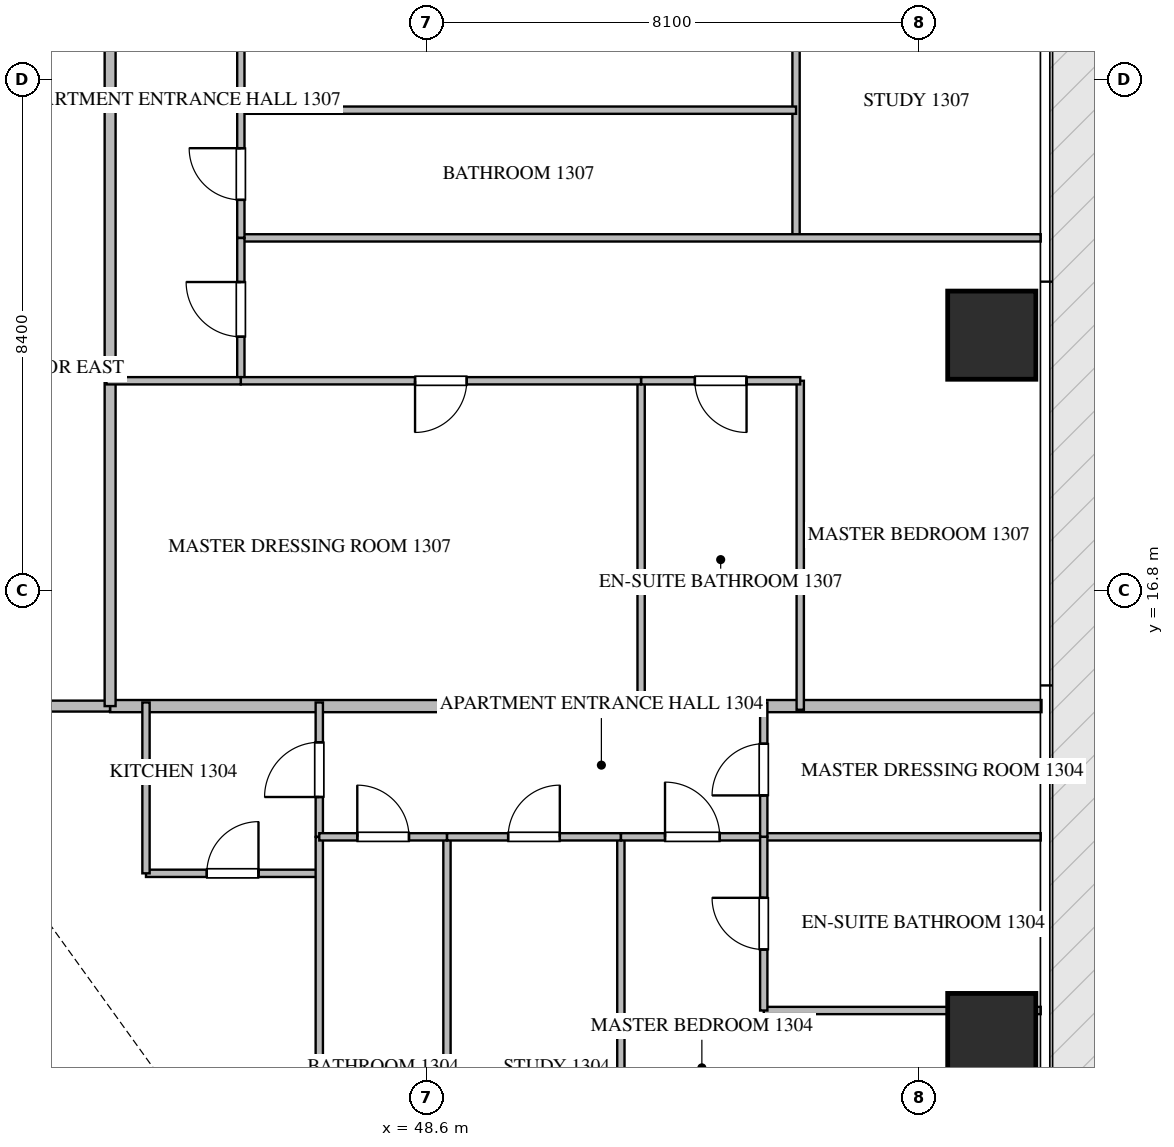
"""IFC4 building model, lengths in metres.
Left out: names, types, materials, properties, quantities, classifications, styles, units other than length and angle.
Written with IfcOpenShell. Run it as: python <this file> out.ifc"""

import sys

from ifc_helpers import new_model, si_unit, direction, frame, frame_2d, origin, origin_2d, place, context, subcontext, project, spatial, rectangle, extrude, source, transform, mapped, element, fill, save


model = new_model("IFC4")
c1 = context("Model", 3, precision=1e-05, world=origin(), true_north=direction((0.0, 1.0)))
c2 = subcontext(c1, "Body", "Model", "MODEL_VIEW")
j1 = project(units=[si_unit("LENGTHUNIT", "METRE"), si_unit("PLANEANGLEUNIT", "RADIAN")], contexts=[c1])
p1 = place(None, origin())
s1 = spatial("IfcSite", under=j1, at=p1, CompositionType="ELEMENT")
p2 = place(p1, origin())
s2 = spatial("IfcBuilding", under=s1, at=p2, CompositionType="ELEMENT")
p3 = place(p2, frame((0.0, 0.0, 56.7)))
s3 = spatial("IfcBuildingStorey", under=s2, at=p3, CompositionType="ELEMENT", Elevation=56.7)
m1 = source(origin(), c2, "Body", "SweptSolid", [
    extrude(rectangle(XDim=1.45, YDim=1.45, at=origin_2d()), origin(), (0.0, 0.0, 1.0), 3.75),
])
for number, where, z_axis, x_axis in (
    (1, (57.9, 9.45, -0.26), (0.0, 0.0, 1.0), (1.0, 0.0, 0.0)),
    (2, (57.9, 21.0, -0.26), (0.0, 0.0, 1.0), (1.0, 0.0, 0.0)),
):
    element("IfcColumn", number, at=place(p3, frame(where, z_axis=z_axis, x_axis=x_axis)), inside=s3, PredefinedType="COLUMN", context=c2, shape_type="MappedRepresentation", body=[
        mapped(m1, transform((0.0, 0.0, 0.0), scale=1.0)),
    ])
p4 = place(p3, frame((43.4, 14.9, 0.0), z_axis=(0.0, 0.0, 1.0), x_axis=(1.0, 0.0, 0.0)))
e3 = element("IfcWall", 3, at=p4, inside=s3, PredefinedType="PARTITIONING", context=c2, shape_type="SweptSolid", body=[
    extrude(rectangle(XDim=15.318, YDim=0.2, at=frame_2d((7.659, 0.0))), origin(), (0.0, 0.0, 1.0), 3.49),
])
p5 = place(p3, frame((21.402, 14.9, 0.0), z_axis=(0.0, 0.0, 1.0), x_axis=(1.0, 0.0, 0.0)))
e4 = element("IfcWall", 4, at=p5, inside=s3, PredefinedType="PARTITIONING", context=c2, shape_type="SweptSolid", body=[
    extrude(rectangle(XDim=21.996, YDim=0.18, at=frame_2d((10.998, 0.0))), origin(), (0.0, 0.0, 1.0), 3.49),
])
p6 = place(p5, frame((1.96, 0.0, 0.0)))
e5 = element("IfcOpeningElement", 5, at=p6, cuts=e4, PredefinedType="OPENING", context=c2, shape_type="SweptSolid", body=[
    extrude(rectangle(XDim=1.0, YDim=2.15, at=frame_2d((0.5, 1.075))), frame((0.0, 0.1, 0.0), z_axis=(0.0, -1.0, 0.0), x_axis=(1.0, 0.0, 0.0)), (0.0, 0.0, 1.0), 0.2),
])
p7 = place(p5, frame((5.249, 0.0, 0.0)))
e6 = element("IfcOpeningElement", 6, at=p7, cuts=e4, PredefinedType="OPENING", context=c2, shape_type="SweptSolid", body=[
    extrude(rectangle(XDim=1.0, YDim=2.15, at=frame_2d((0.5, 1.075))), frame((0.0, 0.1, 0.0), z_axis=(0.0, -1.0, 0.0), x_axis=(1.0, 0.0, 0.0)), (0.0, 0.0, 1.0), 0.2),
])
p8 = place(p5, frame((11.653, 0.0, 0.0)))
e7 = element("IfcOpeningElement", 7, at=p8, cuts=e4, PredefinedType="OPENING", context=c2, shape_type="SweptSolid", body=[
    extrude(rectangle(XDim=1.0, YDim=2.15, at=frame_2d((0.5, 1.075))), frame((0.0, 0.1, 0.0), z_axis=(0.0, -1.0, 0.0), x_axis=(1.0, 0.0, 0.0)), (0.0, 0.0, 1.0), 0.2),
])
p9 = place(p5, frame((18.896, 0.0, 0.0)))
e8 = element("IfcOpeningElement", 8, at=p9, cuts=e4, PredefinedType="OPENING", context=c2, shape_type="SweptSolid", body=[
    extrude(rectangle(XDim=1.0, YDim=2.15, at=frame_2d((0.5, 1.075))), frame((0.0, 0.1, 0.0), z_axis=(0.0, -1.0, 0.0), x_axis=(1.0, 0.0, 0.0)), (0.0, 0.0, 1.0), 0.2),
])
p10 = place(p3, frame((43.4, 14.9, 0.0), z_axis=(0.0, 0.0, 1.0), x_axis=(0.0, 1.0, 0.0)))
e9 = element("IfcWall", 9, at=p10, inside=s3, PredefinedType="PARTITIONING", context=c2, shape_type="SweptSolid", body=[
    extrude(rectangle(XDim=20.6, YDim=0.18, at=frame_2d((10.3, 0.0))), origin(), (0.0, 0.0, 1.0), 3.49),
])
p11 = place(p10, frame((17.64, 0.0, 0.0)))
e10 = element("IfcOpeningElement", 10, at=p11, cuts=e9, PredefinedType="OPENING", context=c2, shape_type="SweptSolid", body=[
    extrude(rectangle(XDim=1.0, YDim=2.15, at=frame_2d((0.5, 1.075))), frame((0.0, 0.1, 0.0), z_axis=(0.0, -1.0, 0.0), x_axis=(1.0, 0.0, 0.0)), (0.0, 0.0, 1.0), 0.2),
])
p12 = place(p3, frame((43.99, 12.15, 0.0), z_axis=(0.0, 0.0, 1.0), x_axis=(1.0, 0.0, 0.0)))
e11 = element("IfcWall", 11, at=p12, inside=s3, PredefinedType="PARTITIONING", context=c2, shape_type="SweptSolid", body=[
    extrude(rectangle(XDim=2.85, YDim=0.12, at=frame_2d((1.425, 0.0))), origin(), (0.0, 0.0, 1.0), 3.49),
])
p13 = place(p12, frame((1.0, 0.0, 0.0)))
e12 = element("IfcOpeningElement", 12, at=p13, cuts=e11, PredefinedType="OPENING", context=c2, shape_type="SweptSolid", body=[
    extrude(rectangle(XDim=0.85, YDim=2.1, at=frame_2d((0.425, 1.05))), frame((0.0, 0.07, 0.0), z_axis=(0.0, -1.0, 0.0), x_axis=(1.0, 0.0, 0.0)), (0.0, 0.0, 1.0), 0.14),
])
p14 = place(p3, frame((43.99, 12.15, 0.0), z_axis=(0.0, 0.0, 1.0), x_axis=(0.0, 1.0, 0.0)))
e13 = element("IfcWall", 13, at=p14, inside=s3, PredefinedType="PARTITIONING", context=c2, shape_type="SweptSolid", body=[
    extrude(rectangle(XDim=2.81, YDim=0.12, at=frame_2d((1.405, 0.0))), origin(), (0.0, 0.0, 1.0), 3.49),
])
p15 = place(p3, frame((46.84, 12.75, 0.0), z_axis=(0.0, 0.0, 1.0), x_axis=(0.0, 1.0, 0.0)))
e14 = element("IfcWall", 14, at=p15, inside=s3, PredefinedType="PARTITIONING", context=c2, shape_type="SweptSolid", body=[
    extrude(rectangle(XDim=2.21, YDim=0.12, at=frame_2d((1.105, 0.0))), origin(), (0.0, 0.0, 1.0), 3.49),
])
p16 = place(p15, frame((0.655, 0.0, 0.0)))
e15 = element("IfcOpeningElement", 15, at=p16, cuts=e14, PredefinedType="OPENING", context=c2, shape_type="SweptSolid", body=[
    extrude(rectangle(XDim=0.9, YDim=2.1, at=frame_2d((0.45, 1.05))), frame((0.0, 0.07, 0.0), z_axis=(0.0, -1.0, 0.0), x_axis=(1.0, 0.0, 0.0)), (0.0, 0.0, 1.0), 0.14),
])
p17 = place(p3, frame((46.84, 5.721, 0.0), z_axis=(0.0, 0.0, 1.0), x_axis=(0.0, 1.0, 0.0)))
e16 = element("IfcWall", 16, at=p17, inside=s3, PredefinedType="PARTITIONING", context=c2, shape_type="SweptSolid", body=[
    extrude(rectangle(XDim=7.027, YDim=0.12, at=frame_2d((3.514, 0.0))), origin(), (0.0, 0.0, 1.0), 3.49),
])
p18 = place(p3, frame((51.8, 4.495, 0.0), z_axis=(0.0, 0.0, 1.0), x_axis=(0.0, 1.0, 0.0)))
e17 = element("IfcWall", 17, at=p18, inside=s3, PredefinedType="PARTITIONING", context=c2, shape_type="SweptSolid", body=[
    extrude(rectangle(XDim=8.255, YDim=0.12, at=frame_2d((4.127, 0.0))), origin(), (0.0, 0.0, 1.0), 3.49),
])
p19 = place(p3, frame((48.94, 5.719, 0.0), z_axis=(0.0, 0.0, 1.0), x_axis=(0.0, 1.0, 0.0)))
e18 = element("IfcWall", 18, at=p19, inside=s3, PredefinedType="PARTITIONING", context=c2, shape_type="SweptSolid", body=[
    extrude(rectangle(XDim=7.031, YDim=0.12, at=frame_2d((3.516, 0.0))), origin(), (0.0, 0.0, 1.0), 3.49),
])
p20 = place(p3, frame((46.84, 12.75, 0.0), z_axis=(0.0, 0.0, 1.0), x_axis=(1.0, 0.0, 0.0)))
e19 = element("IfcWall", 19, at=p20, inside=s3, PredefinedType="PARTITIONING", context=c2, shape_type="SweptSolid", body=[
    extrude(rectangle(XDim=2.1, YDim=0.12, at=frame_2d((1.05, 0.0))), origin(), (0.0, 0.0, 1.0), 3.49),
])
p21 = place(p20, frame((0.625, 0.0, 0.0)))
e20 = element("IfcOpeningElement", 20, at=p21, cuts=e19, PredefinedType="OPENING", context=c2, shape_type="SweptSolid", body=[
    extrude(rectangle(XDim=0.85, YDim=2.1, at=frame_2d((0.425, 1.05))), frame((0.0, 0.07, 0.0), z_axis=(0.0, -1.0, 0.0), x_axis=(1.0, 0.0, 0.0)), (0.0, 0.0, 1.0), 0.14),
])
p22 = place(p3, frame((48.942, 12.75, 0.0), z_axis=(0.0, 0.0, 1.0), x_axis=(1.0, 0.0, 0.0)))
e21 = element("IfcWall", 21, at=p22, inside=s3, PredefinedType="PARTITIONING", context=c2, shape_type="SweptSolid", body=[
    extrude(rectangle(XDim=2.858, YDim=0.12, at=frame_2d((1.429, 0.0))), origin(), (0.0, 0.0, 1.0), 3.49),
])
p23 = place(p22, frame((1.004, 0.0, 0.0)))
e22 = element("IfcOpeningElement", 22, at=p23, cuts=e21, PredefinedType="OPENING", context=c2, shape_type="SweptSolid", body=[
    extrude(rectangle(XDim=0.85, YDim=2.1, at=frame_2d((0.425, 1.05))), frame((0.0, 0.07, 0.0), z_axis=(0.0, -1.0, 0.0), x_axis=(1.0, 0.0, 0.0)), (0.0, 0.0, 1.0), 0.14),
])
p24 = place(p3, frame((51.802, 12.75, 0.0), z_axis=(0.0, 0.0, 1.0), x_axis=(1.0, 0.0, 0.0)))
e23 = element("IfcWall", 23, at=p24, inside=s3, PredefinedType="PARTITIONING", context=c2, shape_type="SweptSolid", body=[
    extrude(rectangle(XDim=2.348, YDim=0.12, at=frame_2d((1.174, 0.0))), origin(), (0.0, 0.0, 1.0), 3.49),
])
p25 = place(p24, frame((0.724, 0.0, 0.0)))
e24 = element("IfcOpeningElement", 24, at=p25, cuts=e23, PredefinedType="OPENING", context=c2, shape_type="SweptSolid", body=[
    extrude(rectangle(XDim=0.9, YDim=2.1, at=frame_2d((0.45, 1.05))), frame((0.0, 0.07, 0.0), z_axis=(0.0, -1.0, 0.0), x_axis=(1.0, 0.0, 0.0)), (0.0, 0.0, 1.0), 0.14),
])
p26 = place(p3, frame((54.15, 9.894, 0.0), z_axis=(0.0, 0.0, 1.0), x_axis=(1.0, 0.0, 0.0)))
e25 = element("IfcWall", 25, at=p26, inside=s3, PredefinedType="PARTITIONING", context=c2, shape_type="SweptSolid", body=[
    extrude(rectangle(XDim=4.555, YDim=0.12, at=frame_2d((2.278, 0.0))), origin(), (0.0, 0.0, 1.0), 3.49),
])
p27 = place(p3, frame((54.152, 12.75, 0.0), z_axis=(0.0, 0.0, 1.0), x_axis=(1.0, 0.0, 0.0)))
e26 = element("IfcWall", 26, at=p27, inside=s3, PredefinedType="PARTITIONING", context=c2, shape_type="SweptSolid", body=[
    extrude(rectangle(XDim=4.553, YDim=0.12, at=frame_2d((2.276, 0.0))), origin(), (0.0, 0.0, 1.0), 3.49),
])
p28 = place(p3, frame((54.15, 9.894, 0.0), z_axis=(0.0, 0.0, 1.0), x_axis=(0.0, 1.0, 0.0)))
e27 = element("IfcWall", 27, at=p28, inside=s3, PredefinedType="PARTITIONING", context=c2, shape_type="SweptSolid", body=[
    extrude(rectangle(XDim=2.856, YDim=0.12, at=frame_2d((1.428, 0.0))), origin(), (0.0, 0.0, 1.0), 3.49),
])
p29 = place(p28, frame((1.003, 0.0, 0.0)))
e28 = element("IfcOpeningElement", 28, at=p29, cuts=e27, PredefinedType="OPENING", context=c2, shape_type="SweptSolid", body=[
    extrude(rectangle(XDim=0.85, YDim=2.1, at=frame_2d((0.425, 1.05))), frame((0.0, 0.07, 0.0), z_axis=(0.0, -1.0, 0.0), x_axis=(1.0, 0.0, 0.0)), (0.0, 0.0, 1.0), 0.14),
])
p30 = place(p3, frame((54.15, 12.752, 0.0), z_axis=(0.0, 0.0, 1.0), x_axis=(0.0, 1.0, 0.0)))
e29 = element("IfcWall", 29, at=p30, inside=s3, PredefinedType="PARTITIONING", context=c2, shape_type="SweptSolid", body=[
    extrude(rectangle(XDim=2.208, YDim=0.12, at=frame_2d((1.104, 0.0))), origin(), (0.0, 0.0, 1.0), 3.49),
])
p31 = place(p30, frame((0.679, 0.0, 0.0)))
e30 = element("IfcOpeningElement", 30, at=p31, cuts=e29, PredefinedType="OPENING", context=c2, shape_type="SweptSolid", body=[
    extrude(rectangle(XDim=0.85, YDim=2.1, at=frame_2d((0.425, 1.05))), frame((0.0, 0.07, 0.0), z_axis=(0.0, -1.0, 0.0), x_axis=(1.0, 0.0, 0.0)), (0.0, 0.0, 1.0), 0.14),
])
p32 = place(p3, frame((54.681, 22.6, 0.0), z_axis=(0.0, 0.0, 1.0), x_axis=(0.0, 1.0, 0.0)))
e31 = element("IfcWall", 31, at=p32, inside=s3, PredefinedType="PARTITIONING", context=c2, shape_type="SweptSolid", body=[
    extrude(rectangle(XDim=5.07, YDim=0.12, at=frame_2d((2.535, 0.0))), origin(), (0.0, 0.0, 1.0), 3.49),
])
p33 = place(p3, frame((58.705, 22.6, 0.0), z_axis=(0.0, 0.0, 1.0), x_axis=(-1.0, 0.0, 0.0)))
e32 = element("IfcWall", 32, at=p33, inside=s3, PredefinedType="PARTITIONING", context=c2, shape_type="SweptSolid", body=[
    extrude(rectangle(XDim=13.155, YDim=0.12, at=frame_2d((6.578, 0.0))), origin(), (0.0, 0.0, 1.0), 3.49),
])
p34 = place(p3, frame((54.681, 24.7, 0.0), z_axis=(0.0, 0.0, 1.0), x_axis=(-1.0, 0.0, 0.0)))
e33 = element("IfcWall", 33, at=p34, inside=s3, PredefinedType="PARTITIONING", context=c2, shape_type="SweptSolid", body=[
    extrude(rectangle(XDim=9.131, YDim=0.12, at=frame_2d((4.565, 0.0))), origin(), (0.0, 0.0, 1.0), 3.49),
])
p35 = place(p3, frame((45.55, 22.6, 0.0), z_axis=(0.0, 0.0, 1.0), x_axis=(0.0, 1.0, 0.0)))
e34 = element("IfcWall", 34, at=p35, inside=s3, PredefinedType="PARTITIONING", context=c2, shape_type="SweptSolid", body=[
    extrude(rectangle(XDim=2.1, YDim=0.12, at=frame_2d((1.05, 0.0))), origin(), (0.0, 0.0, 1.0), 3.49),
])
p36 = place(p35, frame((0.625, 0.0, 0.0)))
e35 = element("IfcOpeningElement", 35, at=p36, cuts=e34, PredefinedType="OPENING", context=c2, shape_type="SweptSolid", body=[
    extrude(rectangle(XDim=0.85, YDim=2.1, at=frame_2d((0.425, 1.05))), frame((0.0, 0.07, 0.0), z_axis=(0.0, -1.0, 0.0), x_axis=(1.0, 0.0, 0.0)), (0.0, 0.0, 1.0), 0.14),
])
p37 = place(p3, frame((45.55, 24.702, 0.0), z_axis=(0.0, 0.0, 1.0), x_axis=(0.0, 1.0, 0.0)))
e36 = element("IfcWall", 36, at=p37, inside=s3, PredefinedType="PARTITIONING", context=c2, shape_type="SweptSolid", body=[
    extrude(rectangle(XDim=2.968, YDim=0.12, at=frame_2d((1.484, 0.0))), origin(), (0.0, 0.0, 1.0), 3.49),
])
p38 = place(p37, frame((1.059, 0.0, 0.0)))
e37 = element("IfcOpeningElement", 37, at=p38, cuts=e36, PredefinedType="OPENING", context=c2, shape_type="SweptSolid", body=[
    extrude(rectangle(XDim=0.85, YDim=2.1, at=frame_2d((0.425, 1.05))), frame((0.0, 0.07, 0.0), z_axis=(0.0, -1.0, 0.0), x_axis=(1.0, 0.0, 0.0)), (0.0, 0.0, 1.0), 0.14),
])
p39 = place(p3, frame((45.55, 20.25, 0.0), z_axis=(0.0, 0.0, 1.0), x_axis=(0.0, 1.0, 0.0)))
e38 = element("IfcWall", 38, at=p39, inside=s3, PredefinedType="PARTITIONING", context=c2, shape_type="SweptSolid", body=[
    extrude(rectangle(XDim=2.348, YDim=0.12, at=frame_2d((1.174, 0.0))), origin(), (0.0, 0.0, 1.0), 3.49),
])
p40 = place(p39, frame((0.724, 0.0, 0.0)))
e39 = element("IfcOpeningElement", 39, at=p40, cuts=e38, PredefinedType="OPENING", context=c2, shape_type="SweptSolid", body=[
    extrude(rectangle(XDim=0.9, YDim=2.1, at=frame_2d((0.45, 1.05))), frame((0.0, 0.07, 0.0), z_axis=(0.0, -1.0, 0.0), x_axis=(1.0, 0.0, 0.0)), (0.0, 0.0, 1.0), 0.14),
])
for number, where, z_axis, x_axis in (
    (40, (54.75, 14.84, 0.0), (0.0, 0.0, 1.0), (0.0, 1.0, 0.0)),
    (41, (52.133, 14.84, 0.0), (0.0, 0.0, 1.0), (0.0, 1.0, 0.0)),
):
    element("IfcWall", number, at=place(p3, frame(where, z_axis=z_axis, x_axis=x_axis)), inside=s3, PredefinedType="PARTITIONING", context=c2, shape_type="SweptSolid", body=[
        extrude(rectangle(XDim=5.41, YDim=0.12, at=frame_2d((2.705, 0.0))), origin(), (0.0, 0.0, 1.0), 3.49),
    ])
p41 = place(p3, frame((54.75, 20.25, 0.0), z_axis=(0.0, 0.0, 1.0), x_axis=(-1.0, 0.0, 0.0)))
e42 = element("IfcWall", 42, at=p41, inside=s3, PredefinedType="PARTITIONING", context=c2, shape_type="SweptSolid", body=[
    extrude(rectangle(XDim=2.617, YDim=0.12, at=frame_2d((1.309, 0.0))), origin(), (0.0, 0.0, 1.0), 3.49),
])
p42 = place(p41, frame((0.883, 0.0, 0.0)))
e43 = element("IfcOpeningElement", 43, at=p42, cuts=e42, PredefinedType="OPENING", context=c2, shape_type="SweptSolid", body=[
    extrude(rectangle(XDim=0.85, YDim=2.1, at=frame_2d((0.425, 1.05))), frame((0.0, 0.07, 0.0), z_axis=(0.0, -1.0, 0.0), x_axis=(1.0, 0.0, 0.0)), (0.0, 0.0, 1.0), 0.14),
])
p43 = place(p3, frame((52.131, 20.25, 0.0), z_axis=(0.0, 0.0, 1.0), x_axis=(-1.0, 0.0, 0.0)))
e44 = element("IfcWall", 44, at=p43, inside=s3, PredefinedType="PARTITIONING", context=c2, shape_type="SweptSolid", body=[
    extrude(rectangle(XDim=6.581, YDim=0.12, at=frame_2d((3.291, 0.0))), origin(), (0.0, 0.0, 1.0), 3.49),
])
p44 = place(p43, frame((2.866, 0.0, 0.0)))
e45 = element("IfcOpeningElement", 45, at=p44, cuts=e44, PredefinedType="OPENING", context=c2, shape_type="SweptSolid", body=[
    extrude(rectangle(XDim=0.85, YDim=2.1, at=frame_2d((0.425, 1.05))), frame((0.0, 0.07, 0.0), z_axis=(0.0, -1.0, 0.0), x_axis=(1.0, 0.0, 0.0)), (0.0, 0.0, 1.0), 0.14),
])
p45 = place(p3, frame((45.548, 20.25, 0.0), z_axis=(0.0, 0.0, 1.0), x_axis=(-1.0, 0.0, 0.0)))
e46 = element("IfcWall", 46, at=p45, inside=s3, PredefinedType="PARTITIONING", context=c2, shape_type="SweptSolid", body=[
    extrude(rectangle(XDim=2.208, YDim=0.12, at=frame_2d((1.104, 0.0))), origin(), (0.0, 0.0, 1.0), 3.49),
])
m2 = source(origin(), c2, "Body", "SweptSolid", [
    extrude(rectangle(XDim=0.85, YDim=2.1, at=frame_2d((0.425, 1.05))), frame((0.0, 0.025, 0.0), z_axis=(0.0, -1.0, 0.0), x_axis=(1.0, 0.0, 0.0)), (0.0, 0.0, 1.0), 0.05),
])
p46 = place(p13, origin())
e47 = element("IfcDoor", 47, at=p46, inside=s3, OperationType="SINGLE_SWING_RIGHT", PredefinedType="DOOR", context=c2, shape_type="MappedRepresentation", body=[
    mapped(m2, transform((0.0, 0.0, 0.0), scale=1.0)),
])
fill(e12, e47)
m3 = source(origin(), c2, "Body", "SweptSolid", [
    extrude(rectangle(XDim=0.9, YDim=2.1, at=frame_2d((0.45, 1.05))), frame((0.0, 0.025, 0.0), z_axis=(0.0, -1.0, 0.0), x_axis=(1.0, 0.0, 0.0)), (0.0, 0.0, 1.0), 0.05),
])
p47 = place(p16, origin())
e48 = element("IfcDoor", 48, at=p47, inside=s3, OperationType="SINGLE_SWING_LEFT", PredefinedType="DOOR", context=c2, shape_type="MappedRepresentation", body=[
    mapped(m3, transform((0.0, 0.0, 0.0), scale=1.0)),
])
fill(e15, e48)
p48 = place(p21, origin())
e49 = element("IfcDoor", 49, at=p48, inside=s3, OperationType="SINGLE_SWING_LEFT", PredefinedType="DOOR", context=c2, shape_type="MappedRepresentation", body=[
    mapped(m2, transform((0.0, 0.0, 0.0), scale=1.0)),
])
fill(e20, e49)
p49 = place(p23, origin())
e50 = element("IfcDoor", 50, at=p49, inside=s3, OperationType="SINGLE_SWING_RIGHT", PredefinedType="DOOR", context=c2, shape_type="MappedRepresentation", body=[
    mapped(m2, transform((0.0, 0.0, 0.0), scale=1.0)),
])
fill(e22, e50)
p50 = place(p25, origin())
e51 = element("IfcDoor", 51, at=p50, inside=s3, OperationType="SINGLE_SWING_LEFT", PredefinedType="DOOR", context=c2, shape_type="MappedRepresentation", body=[
    mapped(m3, transform((0.0, 0.0, 0.0), scale=1.0)),
])
fill(e24, e51)
p51 = place(p29, origin())
e52 = element("IfcDoor", 52, at=p51, inside=s3, OperationType="SINGLE_SWING_RIGHT", PredefinedType="DOOR", context=c2, shape_type="MappedRepresentation", body=[
    mapped(m2, transform((0.0, 0.0, 0.0), scale=1.0)),
])
fill(e28, e52)
p52 = place(p31, origin())
e53 = element("IfcDoor", 53, at=p52, inside=s3, OperationType="SINGLE_SWING_LEFT", PredefinedType="DOOR", context=c2, shape_type="MappedRepresentation", body=[
    mapped(m2, transform((0.0, 0.0, 0.0), scale=1.0)),
])
fill(e30, e53)
p53 = place(p36, origin())
e54 = element("IfcDoor", 54, at=p53, inside=s3, OperationType="SINGLE_SWING_RIGHT", PredefinedType="DOOR", context=c2, shape_type="MappedRepresentation", body=[
    mapped(m2, transform((0.0, 0.0, 0.0), scale=1.0)),
])
fill(e35, e54)
p54 = place(p40, origin())
e55 = element("IfcDoor", 55, at=p54, inside=s3, OperationType="SINGLE_SWING_RIGHT", PredefinedType="DOOR", context=c2, shape_type="MappedRepresentation", body=[
    mapped(m3, transform((0.0, 0.0, 0.0), scale=1.0)),
])
fill(e39, e55)
p55 = place(p42, origin())
e56 = element("IfcDoor", 56, at=p55, inside=s3, OperationType="SINGLE_SWING_LEFT", PredefinedType="DOOR", context=c2, shape_type="MappedRepresentation", body=[
    mapped(m2, transform((0.0, 0.0, 0.0), scale=1.0)),
])
fill(e43, e56)
p56 = place(p44, origin())
e57 = element("IfcDoor", 57, at=p56, inside=s3, OperationType="SINGLE_SWING_RIGHT", PredefinedType="DOOR", context=c2, shape_type="MappedRepresentation", body=[
    mapped(m2, transform((0.0, 0.0, 0.0), scale=1.0)),
])
fill(e45, e57)
save(model, sys.argv[1])
